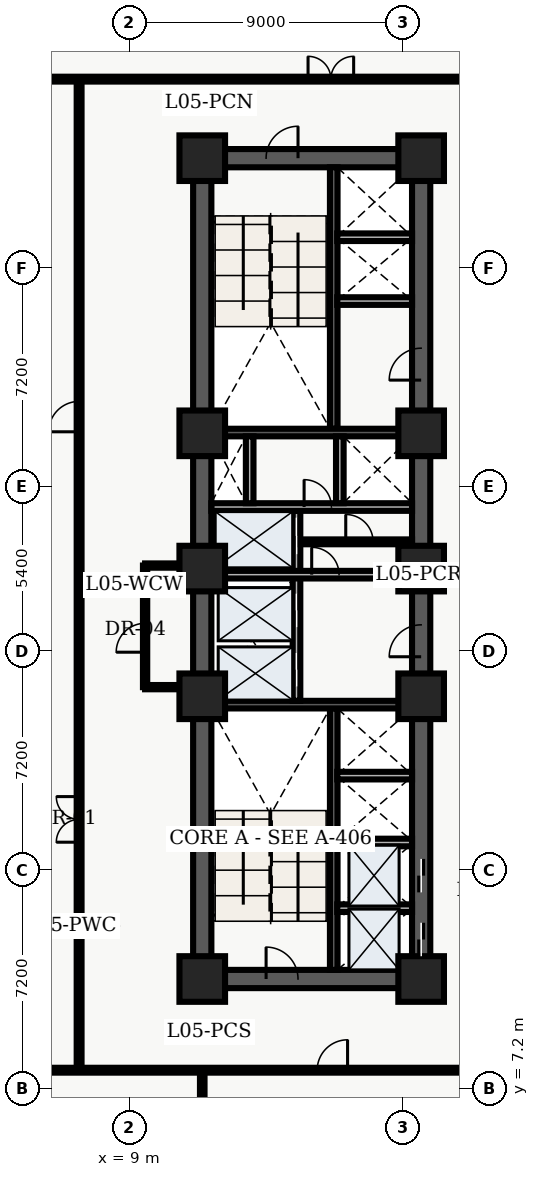
"""IFC4 building model, lengths in metres.
Left out: names, types, materials, properties, quantities, classifications, styles, units other than length and angle.
Written with IfcOpenShell. Run it as: python <this file> out.ifc"""

import sys

from ifc_helpers import new_model, entity, si_unit, converted_unit, direction, frame, origin_with_axes, origin_2d_with_axis, place, context, subcontext, project, spatial, polyline, rectangle, outline, extrude, element, fill, save


model = new_model("IFC4")
c1 = context("Model", 3, precision=1e-05, world=origin_with_axes(), true_north=direction((0.0, 1.0)))
c2 = subcontext(c1, "Body", "Model", "MODEL_VIEW")
j1 = project(units=[si_unit("LENGTHUNIT", "METRE"), converted_unit("PLANEANGLEUNIT", "DEGREE", entity("IfcPlaneAngleMeasure", 0.017), si_unit("PLANEANGLEUNIT", "RADIAN"), dimensions=[0, 0, 0, 0, 0, 0, 0])], contexts=[c1])
p1 = place(None, origin_with_axes())
s1 = spatial("IfcSite", under=j1, at=p1, CompositionType="ELEMENT")
p2 = place(p1, origin_with_axes())
s2 = spatial("IfcBuilding", under=s1, at=p2, CompositionType="ELEMENT")
p3 = place(p2, frame((0.0, 0.0, 24.3), z_axis=(0.0, 0.0, 1.0), x_axis=(1.0, 0.0, 0.0)))
s3 = spatial("IfcBuildingStorey", under=s2, at=p3, CompositionType="ELEMENT", Elevation=24.3)
p4 = place(p3, frame((11.4, 10.8, 0.0), z_axis=(0.0, 0.0, 1.0), x_axis=(0.0, 1.0, 0.0)))
e1 = element("IfcWall", 1, at=p4, inside=s3, PredefinedType="SHEAR", context=c2, shape_type="SweptSolid", body=[
    extrude(outline(polyline([(0.0, -0.3), (27.0, -0.3), (27.0, 0.3), (0.0, 0.3), (0.0, -0.3)])), origin_with_axes(), (0.0, 0.0, 1.0), 4.2),
])
p5 = place(p3, frame((11.4, 10.8, 0.0), z_axis=(0.0, 0.0, 1.0), x_axis=(1.0, 0.0, 0.0)))
e2 = element("IfcWall", 2, at=p5, inside=s3, PredefinedType="SHEAR", context=c2, shape_type="SweptSolid", body=[
    extrude(outline(polyline([(0.0, -0.3), (7.2, -0.3), (7.2, 0.3), (0.0, 0.3), (0.0, -0.3)])), origin_with_axes(), (0.0, 0.0, 1.0), 4.2),
])
p6 = place(p5, frame((2.625, 0.0, 0.0), z_axis=(0.0, 0.0, 1.0), x_axis=(1.0, 0.0, 0.0)))
e3 = element("IfcOpeningElement", 3, at=p6, cuts=e2, PredefinedType="OPENING", context=c2, shape_type="SweptSolid", body=[
    extrude(rectangle(XDim=1.05, YDim=0.62, at=origin_2d_with_axis()), origin_with_axes(), (0.0, 0.0, 1.0), 2.15),
])
p7 = place(p3, frame((11.4, 37.8, 0.0), z_axis=(0.0, 0.0, 1.0), x_axis=(1.0, 0.0, 0.0)))
e4 = element("IfcWall", 4, at=p7, inside=s3, PredefinedType="SHEAR", context=c2, shape_type="SweptSolid", body=[
    extrude(outline(polyline([(0.0, -0.3), (7.2, -0.3), (7.2, 0.3), (0.0, 0.3), (0.0, -0.3)])), origin_with_axes(), (0.0, 0.0, 1.0), 4.2),
])
p8 = place(p7, frame((2.625, 0.0, 0.0), z_axis=(0.0, 0.0, 1.0), x_axis=(1.0, 0.0, 0.0)))
e5 = element("IfcOpeningElement", 5, at=p8, cuts=e4, PredefinedType="OPENING", context=c2, shape_type="SweptSolid", body=[
    extrude(rectangle(XDim=1.05, YDim=0.62, at=origin_2d_with_axis()), origin_with_axes(), (0.0, 0.0, 1.0), 2.15),
])
p9 = place(p3, frame((18.6, 10.8, 0.0), z_axis=(0.0, 0.0, 1.0), x_axis=(0.0, 1.0, 0.0)))
e6 = element("IfcWall", 6, at=p9, inside=s3, PredefinedType="SHEAR", context=c2, shape_type="SweptSolid", body=[
    extrude(outline(polyline([(0.0, -0.3), (13.5, -0.3), (13.5, 0.3), (0.0, 0.3), (0.0, -0.3)])), origin_with_axes(), (0.0, 0.0, 1.0), 4.2),
])
p10 = place(p9, frame((1.3, 0.0, 0.0), z_axis=(0.0, 0.0, 1.0), x_axis=(1.0, 0.0, 0.0)))
e7 = element("IfcOpeningElement", 7, at=p10, cuts=e6, PredefinedType="OPENING", context=c2, shape_type="SweptSolid", body=[
    extrude(rectangle(XDim=1.1, YDim=0.62, at=origin_2d_with_axis()), origin_with_axes(), (0.0, 0.0, 1.0), 2.15),
])
p11 = place(p9, frame((3.4, 0.0, 0.0), z_axis=(0.0, 0.0, 1.0), x_axis=(1.0, 0.0, 0.0)))
e8 = element("IfcOpeningElement", 8, at=p11, cuts=e6, PredefinedType="OPENING", context=c2, shape_type="SweptSolid", body=[
    extrude(rectangle(XDim=1.1, YDim=0.62, at=origin_2d_with_axis()), origin_with_axes(), (0.0, 0.0, 1.0), 2.15),
])
p12 = place(p9, frame((11.125, 0.0, 0.0), z_axis=(0.0, 0.0, 1.0), x_axis=(1.0, 0.0, 0.0)))
e9 = element("IfcOpeningElement", 9, at=p12, cuts=e6, PredefinedType="OPENING", context=c2, shape_type="SweptSolid", body=[
    extrude(rectangle(XDim=1.05, YDim=0.62, at=origin_2d_with_axis()), origin_with_axes(), (0.0, 0.0, 1.0), 2.15),
])
p13 = place(p3, frame((18.6, 24.3, 0.0), z_axis=(0.0, 0.0, 1.0), x_axis=(0.0, 1.0, 0.0)))
e10 = element("IfcWall", 10, at=p13, inside=s3, PredefinedType="SHEAR", context=c2, shape_type="SweptSolid", body=[
    extrude(outline(polyline([(0.0, -0.3), (13.5, -0.3), (13.5, 0.3), (0.0, 0.3), (0.0, -0.3)])), origin_with_axes(), (0.0, 0.0, 1.0), 4.2),
])
p14 = place(p13, frame((6.725, 0.0, 0.0), z_axis=(0.0, 0.0, 1.0), x_axis=(1.0, 0.0, 0.0)))
e11 = element("IfcOpeningElement", 11, at=p14, cuts=e10, PredefinedType="OPENING", context=c2, shape_type="SweptSolid", body=[
    extrude(rectangle(XDim=1.05, YDim=0.62, at=origin_2d_with_axis()), origin_with_axes(), (0.0, 0.0, 1.0), 2.15),
])
p15 = place(p3, frame((15.725, 11.1, 0.0), z_axis=(0.0, 0.0, 1.0), x_axis=(0.0, 1.0, 0.0)))
e12 = element("IfcWall", 12, at=p15, inside=s3, PredefinedType="SHEAR", context=c2, shape_type="SweptSolid", body=[
    extrude(outline(polyline([(0.0, -0.125), (8.6, -0.125), (8.6, 0.125), (0.0, 0.125), (0.0, -0.125)])), origin_with_axes(), (0.0, 0.0, 1.0), 4.2),
])
p16 = place(p3, frame((11.7, 19.825, 0.0), z_axis=(0.0, 0.0, 1.0), x_axis=(1.0, 0.0, 0.0)))
e13 = element("IfcWall", 13, at=p16, inside=s3, PredefinedType="SHEAR", context=c2, shape_type="SweptSolid", body=[
    extrude(outline(polyline([(0.0, -0.125), (6.6, -0.125), (6.6, 0.125), (0.0, 0.125), (0.0, -0.125)])), origin_with_axes(), (0.0, 0.0, 1.0), 4.2),
])
p17 = place(p3, frame((15.725, 28.9, 0.0), z_axis=(0.0, 0.0, 1.0), x_axis=(0.0, 1.0, 0.0)))
e14 = element("IfcWall", 14, at=p17, inside=s3, PredefinedType="SHEAR", context=c2, shape_type="SweptSolid", body=[
    extrude(outline(polyline([(0.0, -0.125), (8.6, -0.125), (8.6, 0.125), (0.0, 0.125), (0.0, -0.125)])), origin_with_axes(), (0.0, 0.0, 1.0), 4.2),
])
p18 = place(p3, frame((11.7, 28.775, 0.0), z_axis=(0.0, 0.0, 1.0), x_axis=(1.0, 0.0, 0.0)))
e15 = element("IfcWall", 15, at=p18, inside=s3, PredefinedType="SHEAR", context=c2, shape_type="SweptSolid", body=[
    extrude(outline(polyline([(0.0, -0.125), (6.6, -0.125), (6.6, 0.125), (0.0, 0.125), (0.0, -0.125)])), origin_with_axes(), (0.0, 0.0, 1.0), 4.2),
])
p19 = place(p3, frame((14.5, 19.95, 0.0), z_axis=(0.0, 0.0, 1.0), x_axis=(0.0, 1.0, 0.0)))
e16 = element("IfcWall", 16, at=p19, inside=s3, PredefinedType="SOLIDWALL", context=c2, shape_type="SweptSolid", body=[
    extrude(outline(polyline([(0.0, -0.125), (6.25, -0.125), (6.25, 0.125), (0.0, 0.125), (0.0, -0.125)])), origin_with_axes(), (0.0, 0.0, 1.0), 3.24),
])
p20 = place(p19, frame((1.025, 0.0, 0.0), z_axis=(0.0, 0.0, 1.0), x_axis=(1.0, 0.0, 0.0)))
e17 = element("IfcOpeningElement", 17, at=p20, cuts=e16, PredefinedType="OPENING", context=c2, shape_type="SweptSolid", body=[
    extrude(rectangle(XDim=1.1, YDim=0.27, at=origin_2d_with_axis()), origin_with_axes(), (0.0, 0.0, 1.0), 2.15),
])
p21 = place(p19, frame((2.975, 0.0, 0.0), z_axis=(0.0, 0.0, 1.0), x_axis=(1.0, 0.0, 0.0)))
e18 = element("IfcOpeningElement", 18, at=p21, cuts=e16, PredefinedType="OPENING", context=c2, shape_type="SweptSolid", body=[
    extrude(rectangle(XDim=1.1, YDim=0.27, at=origin_2d_with_axis()), origin_with_axes(), (0.0, 0.0, 1.0), 2.15),
])
p22 = place(p19, frame((5.425, 0.0, 0.0), z_axis=(0.0, 0.0, 1.0), x_axis=(1.0, 0.0, 0.0)))
e19 = element("IfcOpeningElement", 19, at=p22, cuts=e16, PredefinedType="OPENING", context=c2, shape_type="SweptSolid", body=[
    extrude(rectangle(XDim=1.2, YDim=0.27, at=origin_2d_with_axis()), origin_with_axes(), (0.0, 0.0, 1.0), 2.15),
])
p23 = place(p3, frame((11.7, 24.1, 0.0), z_axis=(0.0, 0.0, 1.0), x_axis=(1.0, 0.0, 0.0)))
e20 = element("IfcWall", 20, at=p23, inside=s3, PredefinedType="SOLIDWALL", context=c2, shape_type="SweptSolid", body=[
    extrude(outline(polyline([(0.0, -0.125), (6.6, -0.125), (6.6, 0.125), (0.0, 0.125), (0.0, -0.125)])), origin_with_axes(), (0.0, 0.0, 1.0), 3.24),
])
p24 = place(p23, frame((3.75, 0.0, 0.0), z_axis=(0.0, 0.0, 1.0), x_axis=(1.0, 0.0, 0.0)))
e21 = element("IfcOpeningElement", 21, at=p24, cuts=e20, PredefinedType="OPENING", context=c2, shape_type="SweptSolid", body=[
    extrude(rectangle(XDim=0.9, YDim=0.27, at=origin_2d_with_axis()), origin_with_axes(), (0.0, 0.0, 1.0), 2.15),
])
p25 = place(p3, frame((11.7, 26.325, 0.0), z_axis=(0.0, 0.0, 1.0), x_axis=(1.0, 0.0, 0.0)))
e22 = element("IfcWall", 22, at=p25, inside=s3, PredefinedType="SOLIDWALL", context=c2, shape_type="SweptSolid", body=[
    extrude(outline(polyline([(0.0, -0.125), (6.6, -0.125), (6.6, 0.125), (0.0, 0.125), (0.0, -0.125)])), origin_with_axes(), (0.0, 0.0, 1.0), 3.24),
])
p26 = place(p25, frame((3.5, 0.0, 0.0), z_axis=(0.0, 0.0, 1.0), x_axis=(1.0, 0.0, 0.0)))
e23 = element("IfcOpeningElement", 23, at=p26, cuts=e22, PredefinedType="OPENING", context=c2, shape_type="SweptSolid", body=[
    extrude(rectangle(XDim=0.9, YDim=0.27, at=origin_2d_with_axis()), origin_with_axes(), (0.0, 0.0, 1.0), 2.15),
])
for number, where, z_axis, x_axis in (
    (24, (12.96, 26.45, 0.0), (0.0, 0.0, 1.0), (0.0, 1.0, 0.0)),
    (25, (15.925, 26.45, 0.0), (0.0, 0.0, 1.0), (0.0, 1.0, 0.0)),
):
    element("IfcWall", number, at=place(p3, frame(where, z_axis=z_axis, x_axis=x_axis)), inside=s3, PredefinedType="SOLIDWALL", context=c2, shape_type="SweptSolid", body=[
        extrude(outline(polyline([(0.0, -0.125), (2.2, -0.125), (2.2, 0.125), (0.0, 0.125), (0.0, -0.125)])), origin_with_axes(), (0.0, 0.0, 1.0), 3.24),
    ])
for number, where, z_axis, x_axis in (
    (26, (11.4, 10.8, 0.0), (0.0, 0.0, 1.0), (1.0, 0.0, 0.0)),
    (27, (11.4, 20.1, 0.0), (0.0, 0.0, 1.0), (1.0, 0.0, 0.0)),
    (28, (11.4, 24.3, 0.0), (0.0, 0.0, 1.0), (1.0, 0.0, 0.0)),
    (29, (11.4, 28.75, 0.0), (0.0, 0.0, 1.0), (1.0, 0.0, 0.0)),
    (30, (11.4, 37.8, 0.0), (0.0, 0.0, 1.0), (1.0, 0.0, 0.0)),
    (31, (18.6, 10.8, 0.0), (0.0, 0.0, 1.0), (1.0, 0.0, 0.0)),
    (32, (18.6, 20.1, 0.0), (0.0, 0.0, 1.0), (1.0, 0.0, 0.0)),
    (33, (18.6, 24.3, 0.0), (0.0, 0.0, 1.0), (1.0, 0.0, 0.0)),
    (34, (18.6, 28.75, 0.0), (0.0, 0.0, 1.0), (1.0, 0.0, 0.0)),
    (35, (18.6, 37.8, 0.0), (0.0, 0.0, 1.0), (1.0, 0.0, 0.0)),
):
    element("IfcColumn", number, at=place(p3, frame(where, z_axis=z_axis, x_axis=x_axis)), inside=s3, PredefinedType="COLUMN", context=c2, shape_type="SweptSolid", body=[
        extrude(rectangle(XDim=1.5, YDim=1.5, at=origin_2d_with_axis()), origin_with_axes(), (0.0, 0.0, 1.0), 4.5),
    ])
p27 = place(p3, frame((14.62, 25.18, 0.0), z_axis=(0.0, 0.0, 1.0), x_axis=(1.0, 0.0, 0.0)))
e36 = element("IfcWall", 36, at=p27, inside=s3, PredefinedType="PARTITIONING", context=c2, shape_type="SweptSolid", body=[
    extrude(outline(polyline([(0.0, -0.08), (3.68, -0.08), (3.68, 0.08), (0.0, 0.08), (0.0, -0.08)])), origin_with_axes(), (0.0, 0.0, 1.0), 3.2),
])
p28 = place(p27, frame((1.95, 0.0, 0.0), z_axis=(0.0, 0.0, 1.0), x_axis=(1.0, 0.0, 0.0)))
e37 = element("IfcOpeningElement", 37, at=p28, cuts=e36, PredefinedType="OPENING", context=c2, shape_type="SweptSolid", body=[
    extrude(rectangle(XDim=0.9, YDim=0.18, at=origin_2d_with_axis()), origin_with_axes(), (0.0, 0.0, 1.0), 2.15),
])
for number, where, z_axis, x_axis in (
    (38, (15.84, 13.13, 0.0), (0.0, 0.0, 1.0), (1.0, 0.0, 0.0)),
    (39, (15.84, 15.29, 0.0), (0.0, 0.0, 1.0), (1.0, 0.0, 0.0)),
    (40, (15.84, 17.49, 0.0), (0.0, 0.0, 1.0), (1.0, 0.0, 0.0)),
    (41, (15.84, 33.1, 0.0), (0.0, 0.0, 1.0), (1.0, 0.0, 0.0)),
    (42, (15.84, 35.2, 0.0), (0.0, 0.0, 1.0), (1.0, 0.0, 0.0)),
):
    element("IfcWall", number, at=place(p3, frame(where, z_axis=z_axis, x_axis=x_axis)), inside=s3, PredefinedType="SOLIDWALL", context=c2, shape_type="SweptSolid", body=[
        extrude(outline(polyline([(0.0, -0.125), (2.46, -0.125), (2.46, 0.125), (0.0, 0.125), (0.0, -0.125)])), origin_with_axes(), (0.0, 0.0, 1.0), 3.2),
    ])
p29 = place(p3, frame((9.52, 20.4, 0.0), z_axis=(0.0, 0.0, 1.0), x_axis=(0.0, 1.0, 0.0)))
e43 = element("IfcWall", 43, at=p29, inside=s3, PredefinedType="PARTITIONING", context=c2, shape_type="SweptSolid", body=[
    extrude(outline(polyline([(0.0, -0.07), (4.0, -0.07), (4.0, 0.07), (0.0, 0.07), (0.0, -0.07)])), origin_with_axes(), (0.0, 0.0, 1.0), 3.2),
])
p30 = place(p29, frame((1.625, 0.0, 0.0), z_axis=(0.0, 0.0, 1.0), x_axis=(1.0, 0.0, 0.0)))
e44 = element("IfcOpeningElement", 44, at=p30, cuts=e43, PredefinedType="OPENING", context=c2, shape_type="SweptSolid", body=[
    extrude(rectangle(XDim=0.95, YDim=0.16, at=origin_2d_with_axis()), origin_with_axes(), (0.0, 0.0, 1.0), 2.15),
])
for number, where, z_axis, x_axis in (
    (45, (9.52, 20.4, 0.0), (0.0, 0.0, 1.0), (1.0, 0.0, 0.0)),
    (46, (9.52, 24.4, 0.0), (0.0, 0.0, 1.0), (1.0, 0.0, 0.0)),
):
    element("IfcWall", number, at=place(p3, frame(where, z_axis=z_axis, x_axis=x_axis)), inside=s3, PredefinedType="PARTITIONING", context=c2, shape_type="SweptSolid", body=[
        extrude(outline(polyline([(0.0, -0.07), (1.58, -0.07), (1.58, 0.07), (0.0, 0.07), (0.0, -0.07)])), origin_with_axes(), (0.0, 0.0, 1.0), 3.2),
    ])
p31 = place(p3, frame((0.38, 7.8, 0.0), z_axis=(0.0, 0.0, 1.0), x_axis=(1.0, 0.0, 0.0)))
e47 = element("IfcWall", 47, at=p31, inside=s3, PredefinedType="PARTITIONING", context=c2, shape_type="SweptSolid", body=[
    extrude(outline(polyline([(0.0, -0.08), (20.92, -0.08), (20.92, 0.08), (0.0, 0.08), (0.0, -0.08)])), origin_with_axes(), (0.0, 0.0, 1.0), 3.2),
])
p32 = place(p31, frame((3.7, 0.0, 0.0), z_axis=(0.0, 0.0, 1.0), x_axis=(1.0, 0.0, 0.0)))
e48 = element("IfcOpeningElement", 48, at=p32, cuts=e47, PredefinedType="OPENING", context=c2, shape_type="SweptSolid", body=[
    extrude(rectangle(XDim=1.0, YDim=0.18, at=origin_2d_with_axis()), origin_with_axes(), (0.0, 0.0, 1.0), 2.15),
])
p33 = place(p31, frame((15.3, 0.0, 0.0), z_axis=(0.0, 0.0, 1.0), x_axis=(1.0, 0.0, 0.0)))
e49 = element("IfcOpeningElement", 49, at=p33, cuts=e47, PredefinedType="OPENING", context=c2, shape_type="SweptSolid", body=[
    extrude(rectangle(XDim=1.0, YDim=0.18, at=origin_2d_with_axis()), origin_with_axes(), (0.0, 0.0, 1.0), 2.15),
])
p34 = place(p3, frame((11.4, 0.38, 0.0), z_axis=(0.0, 0.0, 1.0), x_axis=(0.0, 1.0, 0.0)))
e50 = element("IfcWall", 50, at=p34, inside=s3, PredefinedType="PARTITIONING", context=c2, shape_type="SweptSolid", body=[
    extrude(outline(polyline([(0.0, -0.075), (7.42, -0.075), (7.42, 0.075), (0.0, 0.075), (0.0, -0.075)])), origin_with_axes(), (0.0, 0.0, 1.0), 3.2),
])
p35 = place(p3, frame((0.38, 40.4, 0.0), z_axis=(0.0, 0.0, 1.0), x_axis=(1.0, 0.0, 0.0)))
e51 = element("IfcWall", 51, at=p35, inside=s3, PredefinedType="PARTITIONING", context=c2, shape_type="SweptSolid", body=[
    extrude(outline(polyline([(0.0, -0.08), (20.92, -0.08), (20.92, 0.08), (0.0, 0.08), (0.0, -0.08)])), origin_with_axes(), (0.0, 0.0, 1.0), 3.2),
])
p36 = place(p35, frame((15.25, 0.0, 0.0), z_axis=(0.0, 0.0, 1.0), x_axis=(1.0, 0.0, 0.0)))
e52 = element("IfcOpeningElement", 52, at=p36, cuts=e51, PredefinedType="OPENING", context=c2, shape_type="SweptSolid", body=[
    extrude(rectangle(XDim=1.5, YDim=0.18, at=origin_2d_with_axis()), origin_with_axes(), (0.0, 0.0, 1.0), 2.2),
])
p37 = place(p3, frame((7.35, 7.8, 0.0), z_axis=(0.0, 0.0, 1.0), x_axis=(0.0, 1.0, 0.0)))
e53 = element("IfcWall", 53, at=p37, inside=s3, PredefinedType="PARTITIONING", context=c2, shape_type="SweptSolid", body=[
    extrude(outline(polyline([(0.0, -0.08), (32.6, -0.08), (32.6, 0.08), (0.0, 0.08), (0.0, -0.08)])), origin_with_axes(), (0.0, 0.0, 1.0), 3.2),
])
p38 = place(p37, frame((8.25, 0.0, 0.0), z_axis=(0.0, 0.0, 1.0), x_axis=(1.0, 0.0, 0.0)))
e54 = element("IfcOpeningElement", 54, at=p38, cuts=e53, PredefinedType="OPENING", context=c2, shape_type="SweptSolid", body=[
    extrude(rectangle(XDim=1.5, YDim=0.18, at=origin_2d_with_axis()), origin_with_axes(), (0.0, 0.0, 1.0), 2.2),
])
p39 = place(p37, frame((21.5, 0.0, 0.0), z_axis=(0.0, 0.0, 1.0), x_axis=(1.0, 0.0, 0.0)))
e55 = element("IfcOpeningElement", 55, at=p39, cuts=e53, PredefinedType="OPENING", context=c2, shape_type="SweptSolid", body=[
    extrude(rectangle(XDim=1.0, YDim=0.18, at=origin_2d_with_axis()), origin_with_axes(), (0.0, 0.0, 1.0), 2.15),
])
p40 = place(p9, frame((1.3, 0.0, 0.0), z_axis=(0.0, 0.0, 1.0), x_axis=(1.0, 0.0, 0.0)))
e56 = element("IfcDoor", 56, at=p40, inside=s3, OperationType="SLIDING_TO_LEFT", PredefinedType="DOOR", context=c2, shape_type="SweptSolid", body=[
    extrude(rectangle(XDim=1.1, YDim=0.09, at=origin_2d_with_axis()), origin_with_axes(), (0.0, 0.0, 1.0), 2.15),
])
fill(e7, e56)
p41 = place(p9, frame((3.4, 0.0, 0.0), z_axis=(0.0, 0.0, 1.0), x_axis=(1.0, 0.0, 0.0)))
e57 = element("IfcDoor", 57, at=p41, inside=s3, OperationType="SLIDING_TO_RIGHT", PredefinedType="DOOR", context=c2, shape_type="SweptSolid", body=[
    extrude(rectangle(XDim=1.1, YDim=0.09, at=origin_2d_with_axis()), origin_with_axes(), (0.0, 0.0, 1.0), 2.15),
])
fill(e8, e57)
p42 = place(p19, frame((1.025, 0.0, 0.0), z_axis=(0.0, 0.0, 1.0), x_axis=(1.0, 0.0, 0.0)))
e58 = element("IfcDoor", 58, at=p42, inside=s3, OperationType="SLIDING_TO_LEFT", PredefinedType="DOOR", context=c2, shape_type="SweptSolid", body=[
    extrude(rectangle(XDim=1.1, YDim=0.09, at=origin_2d_with_axis()), origin_with_axes(), (0.0, 0.0, 1.0), 2.15),
])
fill(e17, e58)
p43 = place(p19, frame((2.975, 0.0, 0.0), z_axis=(0.0, 0.0, 1.0), x_axis=(1.0, 0.0, 0.0)))
e59 = element("IfcDoor", 59, at=p43, inside=s3, OperationType="SLIDING_TO_RIGHT", PredefinedType="DOOR", context=c2, shape_type="SweptSolid", body=[
    extrude(rectangle(XDim=1.1, YDim=0.09, at=origin_2d_with_axis()), origin_with_axes(), (0.0, 0.0, 1.0), 2.15),
])
fill(e18, e59)
p44 = place(p19, frame((5.425, 0.0, 0.0), z_axis=(0.0, 0.0, 1.0), x_axis=(1.0, 0.0, 0.0)))
e60 = element("IfcDoor", 60, at=p44, inside=s3, OperationType="DOUBLE_DOOR_SLIDING", PredefinedType="DOOR", context=c2, shape_type="SweptSolid", body=[
    extrude(rectangle(XDim=1.2, YDim=0.09, at=origin_2d_with_axis()), origin_with_axes(), (0.0, 0.0, 1.0), 2.15),
])
fill(e19, e60)
p45 = place(p5, frame((2.625, 0.0, 0.0), z_axis=(0.0, 0.0, 1.0), x_axis=(1.0, 0.0, 0.0)))
e61 = element("IfcDoor", 61, at=p45, inside=s3, OperationType="SINGLE_SWING_LEFT", PredefinedType="DOOR", context=c2, shape_type="SweptSolid", body=[
    extrude(rectangle(XDim=1.05, YDim=0.09, at=origin_2d_with_axis()), origin_with_axes(), (0.0, 0.0, 1.0), 2.15),
])
fill(e3, e61)
p46 = place(p7, frame((2.625, 0.0, 0.0), z_axis=(0.0, 0.0, 1.0), x_axis=(1.0, 0.0, 0.0)))
e62 = element("IfcDoor", 62, at=p46, inside=s3, OperationType="SINGLE_SWING_RIGHT", PredefinedType="DOOR", context=c2, shape_type="SweptSolid", body=[
    extrude(rectangle(XDim=1.05, YDim=0.09, at=origin_2d_with_axis()), origin_with_axes(), (0.0, 0.0, 1.0), 2.15),
])
fill(e5, e62)
p47 = place(p9, frame((11.125, 0.0, 0.0), z_axis=(0.0, 0.0, 1.0), x_axis=(1.0, 0.0, 0.0)))
e63 = element("IfcDoor", 63, at=p47, inside=s3, OperationType="SINGLE_SWING_LEFT", PredefinedType="DOOR", context=c2, shape_type="SweptSolid", body=[
    extrude(rectangle(XDim=1.05, YDim=0.09, at=origin_2d_with_axis()), origin_with_axes(), (0.0, 0.0, 1.0), 2.15),
])
fill(e9, e63)
p48 = place(p25, frame((3.5, 0.0, 0.0), z_axis=(0.0, 0.0, 1.0), x_axis=(1.0, 0.0, 0.0)))
e64 = element("IfcDoor", 64, at=p48, inside=s3, OperationType="SINGLE_SWING_LEFT", PredefinedType="DOOR", context=c2, shape_type="SweptSolid", body=[
    extrude(rectangle(XDim=0.9, YDim=0.09, at=origin_2d_with_axis()), origin_with_axes(), (0.0, 0.0, 1.0), 2.15),
])
fill(e23, e64)
p49 = place(p23, frame((3.75, 0.0, 0.0), z_axis=(0.0, 0.0, 1.0), x_axis=(1.0, 0.0, 0.0)))
e65 = element("IfcDoor", 65, at=p49, inside=s3, OperationType="SINGLE_SWING_LEFT", PredefinedType="DOOR", context=c2, shape_type="SweptSolid", body=[
    extrude(rectangle(XDim=0.9, YDim=0.09, at=origin_2d_with_axis()), origin_with_axes(), (0.0, 0.0, 1.0), 2.15),
])
fill(e21, e65)
p50 = place(p27, frame((1.95, 0.0, 0.0), z_axis=(0.0, 0.0, 1.0), x_axis=(1.0, 0.0, 0.0)))
e66 = element("IfcDoor", 66, at=p50, inside=s3, OperationType="SINGLE_SWING_LEFT", PredefinedType="DOOR", context=c2, shape_type="SweptSolid", body=[
    extrude(rectangle(XDim=0.9, YDim=0.09, at=origin_2d_with_axis()), origin_with_axes(), (0.0, 0.0, 1.0), 2.15),
])
fill(e37, e66)
p51 = place(p13, frame((6.725, 0.0, 0.0), z_axis=(0.0, 0.0, 1.0), x_axis=(1.0, 0.0, 0.0)))
e67 = element("IfcDoor", 67, at=p51, inside=s3, OperationType="SINGLE_SWING_LEFT", PredefinedType="DOOR", context=c2, shape_type="SweptSolid", body=[
    extrude(rectangle(XDim=1.05, YDim=0.09, at=origin_2d_with_axis()), origin_with_axes(), (0.0, 0.0, 1.0), 2.15),
])
fill(e11, e67)
p52 = place(p29, frame((1.625, 0.0, 0.0), z_axis=(0.0, 0.0, 1.0), x_axis=(1.0, 0.0, 0.0)))
e68 = element("IfcDoor", 68, at=p52, inside=s3, OperationType="SINGLE_SWING_LEFT", PredefinedType="DOOR", context=c2, shape_type="SweptSolid", body=[
    extrude(rectangle(XDim=0.95, YDim=0.084, at=origin_2d_with_axis()), origin_with_axes(), (0.0, 0.0, 1.0), 2.15),
])
fill(e44, e68)
p53 = place(p31, frame((15.3, 0.0, 0.0), z_axis=(0.0, 0.0, 1.0), x_axis=(1.0, 0.0, 0.0)))
e69 = element("IfcDoor", 69, at=p53, inside=s3, OperationType="SINGLE_SWING_RIGHT", PredefinedType="DOOR", context=c2, shape_type="SweptSolid", body=[
    extrude(rectangle(XDim=1.0, YDim=0.09, at=origin_2d_with_axis()), origin_with_axes(), (0.0, 0.0, 1.0), 2.15),
])
fill(e49, e69)
p54 = place(p37, frame((8.25, 0.0, 0.0), z_axis=(0.0, 0.0, 1.0), x_axis=(1.0, 0.0, 0.0)))
e70 = element("IfcDoor", 70, at=p54, inside=s3, OperationType="DOUBLE_DOOR_SINGLE_SWING", PredefinedType="DOOR", context=c2, shape_type="SweptSolid", body=[
    extrude(rectangle(XDim=1.5, YDim=0.09, at=origin_2d_with_axis()), origin_with_axes(), (0.0, 0.0, 1.0), 2.2),
])
fill(e54, e70)
p55 = place(p37, frame((21.5, 0.0, 0.0), z_axis=(0.0, 0.0, 1.0), x_axis=(1.0, 0.0, 0.0)))
e71 = element("IfcDoor", 71, at=p55, inside=s3, OperationType="SINGLE_SWING_LEFT", PredefinedType="DOOR", context=c2, shape_type="SweptSolid", body=[
    extrude(rectangle(XDim=1.0, YDim=0.09, at=origin_2d_with_axis()), origin_with_axes(), (0.0, 0.0, 1.0), 2.15),
])
fill(e55, e71)
p56 = place(p35, frame((15.25, 0.0, 0.0), z_axis=(0.0, 0.0, 1.0), x_axis=(1.0, 0.0, 0.0)))
e72 = element("IfcDoor", 72, at=p56, inside=s3, OperationType="DOUBLE_DOOR_SINGLE_SWING", PredefinedType="DOOR", context=c2, shape_type="SweptSolid", body=[
    extrude(rectangle(XDim=1.5, YDim=0.09, at=origin_2d_with_axis()), origin_with_axes(), (0.0, 0.0, 1.0), 2.2),
])
fill(e52, e72)
save(model, sys.argv[1])
